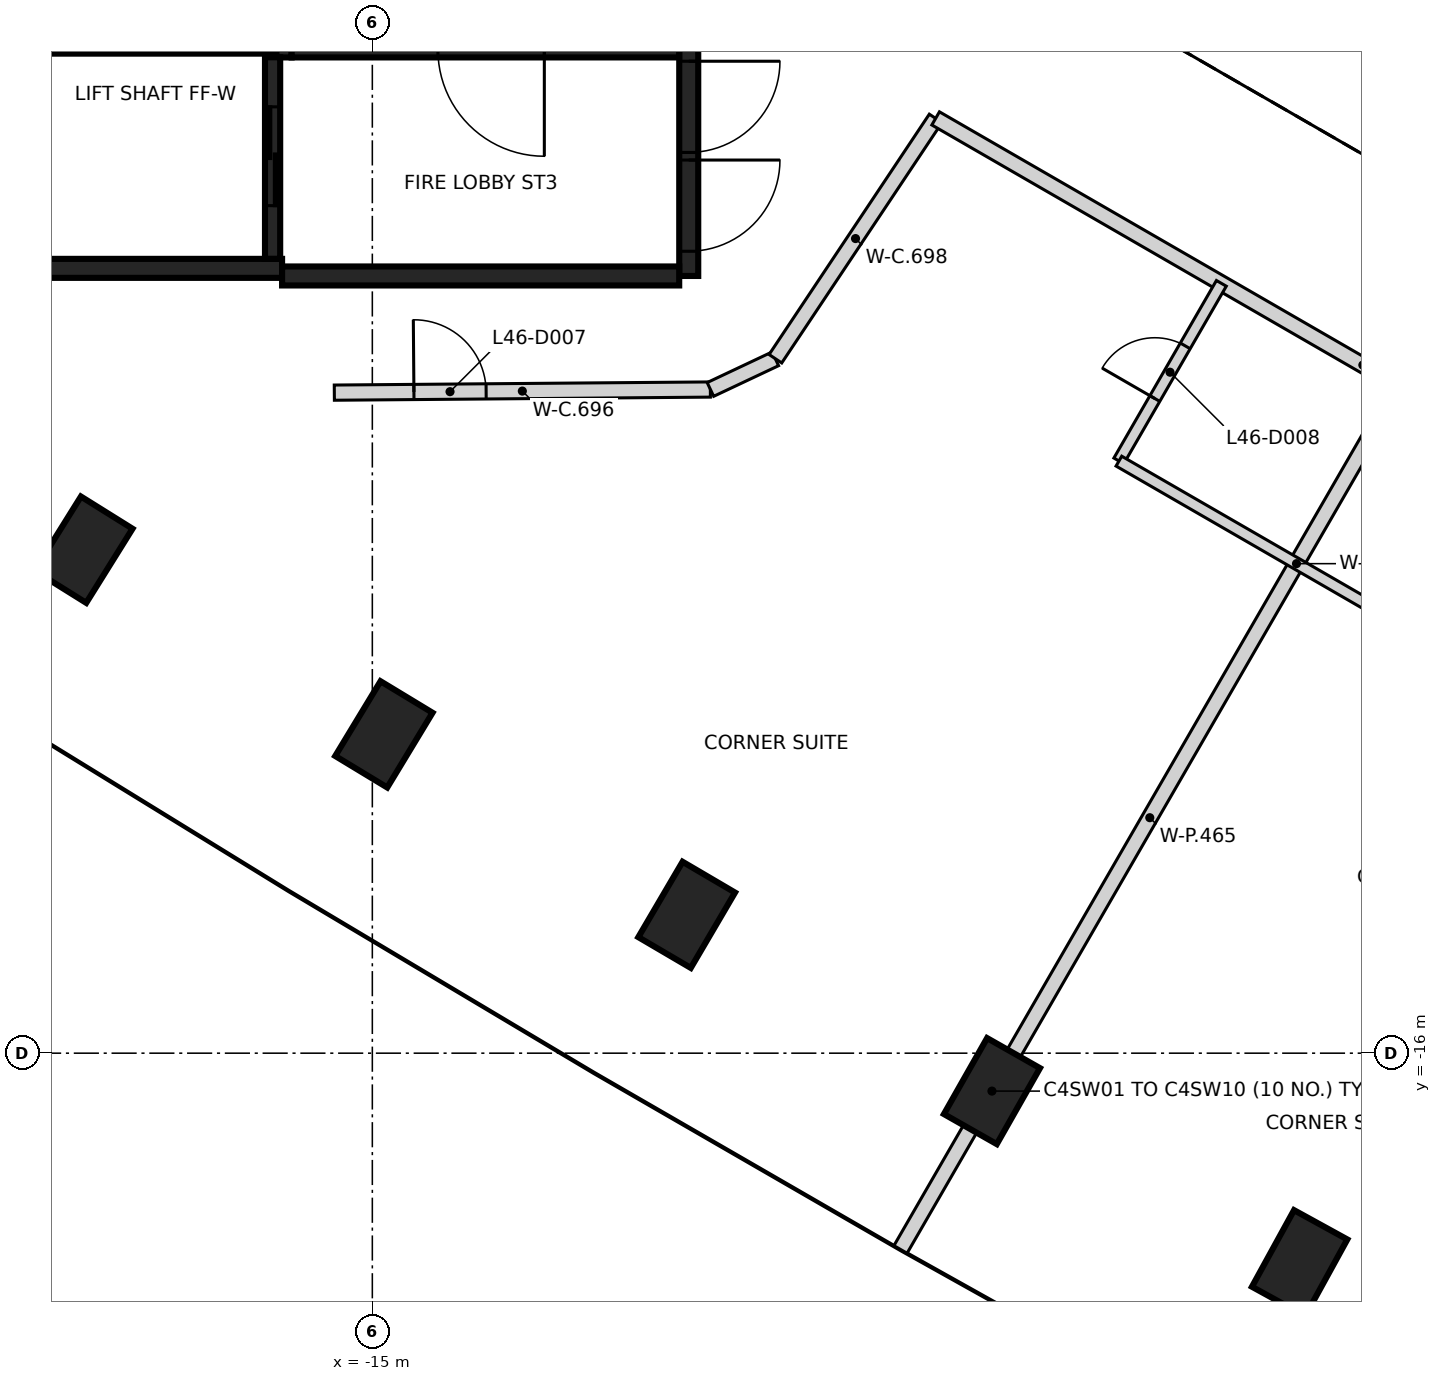
"""IFC4 building model, lengths in metres.
Left out: names, types, materials, properties, quantities, classifications, styles, units other than length and angle.
Written with IfcOpenShell. Run it as: python <this file> out.ifc"""

import sys

from ifc_helpers import new_model, si_unit, direction, frame, frame_2d, origin, origin_2d, place, context, subcontext, project, spatial, rectangle, extrude, element, fill, save


model = new_model("IFC4")
c1 = context("Model", 3, precision=1e-05, world=origin(), true_north=direction((0.0, 1.0)))
c2 = subcontext(c1, "Body", "Model", "MODEL_VIEW")
j1 = project(units=[si_unit("LENGTHUNIT", "METRE"), si_unit("PLANEANGLEUNIT", "RADIAN")], contexts=[c1])
p1 = place(None, origin())
s1 = spatial("IfcSite", under=j1, at=p1, CompositionType="ELEMENT")
p2 = place(p1, origin())
s2 = spatial("IfcBuilding", under=s1, at=p2, CompositionType="ELEMENT")
p3 = place(p2, frame((0.0, 0.0, 186.4)))
s3 = spatial("IfcBuildingStorey", under=s2, at=p3, CompositionType="ELEMENT", Elevation=186.4)
for number, where, z_axis, x_axis in (
    (1, (-18.799, -9.376, -0.35), (0.0, 0.0, 1.0), (0.529, 0.848, 0.0)),
    (2, (-14.848, -11.806, -0.35), (0.0, 0.0, 1.0), (0.518, 0.855, 0.0)),
    (3, (-10.864, -14.18, -0.35), (0.0, 0.0, 1.0), (0.506, 0.862, 0.0)),
    (4, (-6.848, -16.499, -0.35), (0.0, 0.0, 1.0), (0.494, 0.87, 0.0)),
    (5, (-2.8, -18.762, -0.35), (0.0, 0.0, 1.0), (0.482, 0.876, 0.0)),
):
    element("IfcColumn", number, at=place(p3, frame(where, z_axis=z_axis, x_axis=x_axis)), inside=s3, PredefinedType="COLUMN", context=c2, shape_type="SweptSolid", body=[
        extrude(rectangle(XDim=1.15, YDim=0.8, at=origin_2d()), origin(), (0.0, 0.0, 1.0), 3.6),
    ])
p4 = place(p3, frame((-10.837, 5.775, 0.0), z_axis=(0.0, 0.0, 1.0), x_axis=(0.0, -1.0, 0.0)))
e6 = element("IfcWall", 6, at=p4, inside=s3, PredefinedType="SHEAR", context=c2, shape_type="SweptSolid", body=[
    extrude(rectangle(XDim=11.55, YDim=0.25, at=frame_2d((5.775, 0.0))), origin(), (0.0, 0.0, 1.0), 3.25),
])
p5 = place(p4, frame((10.025, 0.0, 0.0)))
e7 = element("IfcOpeningElement", 7, at=p5, cuts=e6, PredefinedType="OPENING", context=c2, shape_type="SweptSolid", body=[
    extrude(rectangle(XDim=1.2, YDim=2.1, at=frame_2d((0.6, 1.05))), frame((0.0, 0.135, 0.0), z_axis=(0.0, -1.0, 0.0), x_axis=(1.0, 0.0, 0.0)), (0.0, 0.0, 1.0), 0.27),
])
p6 = place(p4, frame((8.725, 0.0, 0.0)))
e8 = element("IfcOpeningElement", 8, at=p6, cuts=e6, PredefinedType="OPENING", context=c2, shape_type="SweptSolid", body=[
    extrude(rectangle(XDim=1.2, YDim=2.1, at=frame_2d((0.6, 1.05))), frame((0.0, 0.135, 0.0), z_axis=(0.0, -1.0, 0.0), x_axis=(1.0, 0.0, 0.0)), (0.0, 0.0, 1.0), 0.27),
])
p7 = place(p3, frame((-16.187, -5.675, 0.0), z_axis=(0.0, 0.0, 1.0), x_axis=(-1.0, 0.0, 0.0)))
e9 = element("IfcWall", 9, at=p7, inside=s3, PredefinedType="SHEAR", context=c2, shape_type="SweptSolid", body=[
    extrude(rectangle(XDim=6.125, YDim=0.25, at=frame_2d((3.062, 0.0))), origin(), (0.0, 0.0, 1.0), 3.25),
])
p8 = place(p7, frame((3.563, 0.0, 0.0)))
e10 = element("IfcOpeningElement", 10, at=p8, cuts=e9, PredefinedType="OPENING", context=c2, shape_type="SweptSolid", body=[
    extrude(rectangle(XDim=1.0, YDim=2.1, at=frame_2d((0.5, 1.05))), frame((0.0, 0.135, 0.0), z_axis=(0.0, -1.0, 0.0), x_axis=(1.0, 0.0, 0.0)), (0.0, 0.0, 1.0), 0.27),
])
p9 = place(p3, frame((-10.963, -5.775, 0.0), z_axis=(0.0, 0.0, 1.0), x_axis=(-1.0, 0.0, 0.0)))
e11 = element("IfcWall", 11, at=p9, inside=s3, PredefinedType="SHEAR", context=c2, shape_type="SweptSolid", body=[
    extrude(rectangle(XDim=5.225, YDim=0.25, at=frame_2d((2.612, 0.0))), origin(), (0.0, 0.0, 1.0), 3.25),
])
p10 = place(p3, frame((-16.162, 3.074, 0.0), z_axis=(0.0, 0.0, 1.0), x_axis=(0.0, -1.0, 0.0)))
e12 = element("IfcWall", 12, at=p10, inside=s3, PredefinedType="SHEAR", context=c2, shape_type="SweptSolid", body=[
    extrude(rectangle(XDim=5.974, YDim=0.2, at=frame_2d((2.987, 0.0))), origin(), (0.0, 0.0, 1.0), 3.25),
])
p11 = place(p3, frame((-10.963, -2.8, 0.0), z_axis=(0.0, 0.0, 1.0), x_axis=(-1.0, 0.0, 0.0)))
e13 = element("IfcWall", 13, at=p11, inside=s3, PredefinedType="SHEAR", context=c2, shape_type="SweptSolid", body=[
    extrude(rectangle(XDim=5.098, YDim=0.2, at=frame_2d((2.549, 0.0))), origin(), (0.0, 0.0, 1.0), 3.25),
])
p12 = place(p11, frame((1.774, 0.0, 0.0)))
e14 = element("IfcOpeningElement", 14, at=p12, cuts=e13, PredefinedType="OPENING", context=c2, shape_type="SweptSolid", body=[
    extrude(rectangle(XDim=1.4, YDim=2.1, at=frame_2d((0.7, 1.05))), frame((0.0, 0.11, 0.0), z_axis=(0.0, -1.0, 0.0), x_axis=(1.0, 0.0, 0.0)), (0.0, 0.0, 1.0), 0.22),
])
p13 = place(p3, frame((-19.412, -2.75, 0.0), z_axis=(0.0, 0.0, 1.0), x_axis=(1.0, 0.0, 0.0)))
e15 = element("IfcWall", 15, at=p13, inside=s3, PredefinedType="SHEAR", context=c2, shape_type="SweptSolid", body=[
    extrude(rectangle(XDim=3.1, YDim=0.2, at=frame_2d((1.55, 0.0))), origin(), (0.0, 0.0, 1.0), 3.25),
])
p14 = place(p3, frame((-16.312, -2.898, 0.0), z_axis=(0.0, 0.0, 1.0), x_axis=(0.0, -1.0, 0.0)))
e16 = element("IfcWall", 16, at=p14, inside=s3, PredefinedType="SHEAR", context=c2, shape_type="SweptSolid", body=[
    extrude(rectangle(XDim=2.651, YDim=0.2, at=frame_2d((1.325, 0.0))), origin(), (0.0, 0.0, 1.0), 3.25),
])
p15 = place(p14, frame((0.652, 0.0, 0.0)))
e17 = element("IfcOpeningElement", 17, at=p15, cuts=e16, PredefinedType="OPENING", context=c2, shape_type="SweptSolid", body=[
    extrude(rectangle(XDim=1.3, YDim=2.1, at=frame_2d((0.65, 1.05))), frame((0.0, 0.11, 0.0), z_axis=(0.0, -1.0, 0.0), x_axis=(1.0, 0.0, 0.0)), (0.0, 0.0, 1.0), 0.22),
])
p16 = place(p3, frame((-15.5, -7.31, 0.0), z_axis=(0.0, 0.0, 1.0), x_axis=(0.999965631649, 0.008290688749, 0.0)))
e18 = element("IfcWall", 18, at=p16, inside=s3, PredefinedType="PARTITIONING", context=c2, shape_type="SweptSolid", body=[
    extrude(rectangle(XDim=4.947, YDim=0.2, at=frame_2d((2.474, 0.0))), origin(), (0.0, 0.0, 1.0), 3.25),
])
p17 = place(p16, frame((1.047, 0.0, 0.0)))
e19 = element("IfcOpeningElement", 19, at=p17, cuts=e18, PredefinedType="OPENING", context=c2, shape_type="SweptSolid", body=[
    extrude(rectangle(XDim=0.95, YDim=2.1, at=frame_2d((0.475, 1.05))), frame((0.0, 0.11, 0.0), z_axis=(0.0, -1.0, 0.0), x_axis=(1.0, 0.0, 0.0)), (0.0, 0.0, 1.0), 0.22),
])
p18 = place(p3, frame((-10.552, -7.268, 0.0), z_axis=(0.0, 0.0, 1.0), x_axis=(0.904331815333, 0.426830139255, 0.0)))
e20 = element("IfcWall", 20, at=p18, inside=s3, PredefinedType="PARTITIONING", context=c2, shape_type="SweptSolid", body=[
    extrude(rectangle(XDim=0.944, YDim=0.2, at=frame_2d((0.472, 0.0))), origin(), (0.0, 0.0, 1.0), 3.25),
])
p19 = place(p3, frame((-9.697, -6.864, 0.0), z_axis=(0.0, 0.0, 1.0), x_axis=(0.554670545446, 0.832070060761, 0.0)))
e21 = element("IfcWall", 21, at=p19, inside=s3, PredefinedType="PARTITIONING", context=c2, shape_type="SweptSolid", body=[
    extrude(rectangle(XDim=3.8, YDim=0.2, at=frame_2d((1.9, 0.0))), origin(), (0.0, 0.0, 1.0), 3.25),
])
p20 = place(p3, frame((-7.589, -3.702, 0.0), z_axis=(0.0, 0.0, 1.0), x_axis=(0.86602490244, -0.500000868353, 0.0)))
e22 = element("IfcWall", 22, at=p20, inside=s3, PredefinedType="PARTITIONING", context=c2, shape_type="SweptSolid", body=[
    extrude(rectangle(XDim=12.98, YDim=0.2, at=frame_2d((6.49, 0.0))), origin(), (0.0, 0.0, 1.0), 3.25),
])
p21 = place(p20, frame((11.8, 0.0, 0.0)))
e23 = element("IfcOpeningElement", 23, at=p21, cuts=e22, PredefinedType="OPENING", context=c2, shape_type="SweptSolid", body=[
    extrude(rectangle(XDim=0.95, YDim=2.1, at=frame_2d((0.475, 1.05))), frame((0.0, 0.11, 0.0), z_axis=(0.0, -1.0, 0.0), x_axis=(1.0, 0.0, 0.0)), (0.0, 0.0, 1.0), 0.22),
])
p22 = place(p3, frame((-8.051, -18.582, 0.0), z_axis=(0.0, 0.0, 1.0), x_axis=(0.500024249232, 0.866011403031, 0.0)))
e24 = element("IfcWall", 24, at=p22, inside=s3, PredefinedType="PARTITIONING", context=c2, shape_type="SweptSolid", body=[
    extrude(rectangle(XDim=13.118, YDim=0.2, at=frame_2d((6.559, 0.0))), origin(), (0.0, 0.0, 1.0), 3.25),
])
p23 = place(p3, frame((-5.179, -8.208, 0.0), z_axis=(0.0, 0.0, 1.0), x_axis=(0.500061949227, 0.865989634427, 0.0)))
e25 = element("IfcWall", 25, at=p23, inside=s3, PredefinedType="PARTITIONING", context=c2, shape_type="SweptSolid", body=[
    extrude(rectangle(XDim=2.698, YDim=0.15, at=frame_2d((1.349, 0.0))), origin(), (0.0, 0.0, 1.0), 3.25),
])
p24 = place(p23, frame((0.948, 0.0, 0.0)))
e26 = element("IfcOpeningElement", 26, at=p24, cuts=e25, PredefinedType="OPENING", context=c2, shape_type="SweptSolid", body=[
    extrude(rectangle(XDim=0.8, YDim=2.1, at=frame_2d((0.4, 1.05))), frame((0.0, 0.085, 0.0), z_axis=(0.0, -1.0, 0.0), x_axis=(1.0, 0.0, 0.0)), (0.0, 0.0, 1.0), 0.17),
])
p25 = place(p3, frame((-5.178, -8.211, 0.0), z_axis=(0.0, 0.0, 1.0), x_axis=(0.866046199912, -0.49996397832, 0.0)))
e27 = element("IfcWall", 27, at=p25, inside=s3, PredefinedType="PARTITIONING", context=c2, shape_type="SweptSolid", body=[
    extrude(rectangle(XDim=5.396, YDim=0.15, at=frame_2d((2.698, 0.0))), origin(), (0.0, 0.0, 1.0), 3.25),
])
p26 = place(p15, origin())
e28 = element("IfcDoor", 28, at=p26, inside=s3, OperationType="SLIDING_TO_LEFT", PredefinedType="DOOR", context=c2, shape_type="SweptSolid", body=[
    extrude(rectangle(XDim=1.3, YDim=2.1, at=frame_2d((0.65, 1.05))), frame((0.0, 0.025, 0.0), z_axis=(0.0, -1.0, 0.0), x_axis=(1.0, 0.0, 0.0)), (0.0, 0.0, 1.0), 0.05),
])
fill(e17, e28)
p27 = place(p5, origin())
e29 = element("IfcDoor", 29, at=p27, inside=s3, OperationType="SINGLE_SWING_LEFT", PredefinedType="DOOR", context=c2, shape_type="SweptSolid", body=[
    extrude(rectangle(XDim=1.2, YDim=2.1, at=frame_2d((0.6, 1.05))), frame((0.0, 0.025, 0.0), z_axis=(0.0, -1.0, 0.0), x_axis=(1.0, 0.0, 0.0)), (0.0, 0.0, 1.0), 0.05),
])
fill(e7, e29)
p28 = place(p6, origin())
e30 = element("IfcDoor", 30, at=p28, inside=s3, OperationType="SINGLE_SWING_RIGHT", PredefinedType="DOOR", context=c2, shape_type="SweptSolid", body=[
    extrude(rectangle(XDim=1.2, YDim=2.1, at=frame_2d((0.6, 1.05))), frame((0.0, 0.025, 0.0), z_axis=(0.0, -1.0, 0.0), x_axis=(1.0, 0.0, 0.0)), (0.0, 0.0, 1.0), 0.05),
])
fill(e8, e30)
p29 = place(p17, frame((0.95, 0.0, 0.0), z_axis=(0.0, 0.0, 1.0), x_axis=(-1.0, 0.0, 0.0)))
e31 = element("IfcDoor", 31, at=p29, inside=s3, OperationType="SINGLE_SWING_LEFT", PredefinedType="DOOR", context=c2, shape_type="SweptSolid", body=[
    extrude(rectangle(XDim=0.95, YDim=2.1, at=frame_2d((0.475, 1.05))), frame((0.0, 0.025, 0.0), z_axis=(0.0, -1.0, 0.0), x_axis=(1.0, 0.0, 0.0)), (0.0, 0.0, 1.0), 0.05),
])
fill(e19, e31)
p30 = place(p24, origin())
e32 = element("IfcDoor", 32, at=p30, inside=s3, OperationType="SINGLE_SWING_LEFT", PredefinedType="DOOR", context=c2, shape_type="SweptSolid", body=[
    extrude(rectangle(XDim=0.8, YDim=2.1, at=frame_2d((0.4, 1.05))), frame((0.0, 0.025, 0.0), z_axis=(0.0, -1.0, 0.0), x_axis=(1.0, 0.0, 0.0)), (0.0, 0.0, 1.0), 0.05),
])
fill(e26, e32)
save(model, sys.argv[1])
